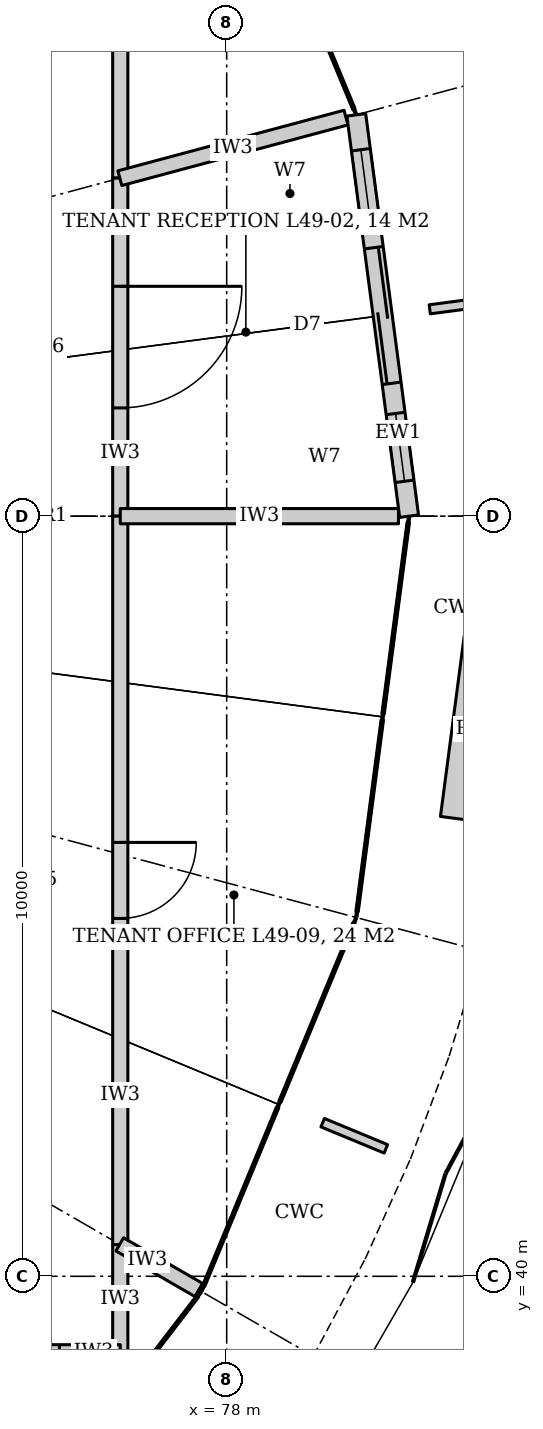
"""IFC4 building model, lengths in metres.
Left out: names, types, materials, properties, quantities, classifications, styles, units other than length and angle.
Written with IfcOpenShell. Run it as: python <this file> out.ifc"""

import sys

from ifc_helpers import new_model, si_unit, direction, frame, frame_2d, origin, place, context, subcontext, project, spatial, rectangle, extrude, element, fill, save


model = new_model("IFC4")
c1 = context("Model", 3, precision=1e-05, world=origin(), true_north=direction((0.0, 1.0)))
c2 = subcontext(c1, "Body", "Model", "MODEL_VIEW")
j1 = project(units=[si_unit("LENGTHUNIT", "METRE"), si_unit("PLANEANGLEUNIT", "RADIAN")], contexts=[c1])
p1 = place(None, origin())
s1 = spatial("IfcSite", under=j1, at=p1, CompositionType="ELEMENT")
p2 = place(p1, origin())
s2 = spatial("IfcBuilding", under=s1, at=p2, CompositionType="ELEMENT")
p3 = place(p2, frame((0.0, 0.0, 215.0)))
s3 = spatial("IfcBuildingStorey", under=s2, at=p3, CompositionType="ELEMENT", Elevation=215.0)
p4 = place(p3, frame((76.6, 58.8, 0.0), z_axis=(0.0, 0.0, 1.0), x_axis=(0.0, -1.0, 0.0)))
e1 = element("IfcWall", 1, at=p4, inside=s3, PredefinedType="PARTITIONING", context=c2, shape_type="SweptSolid", body=[
    extrude(rectangle(XDim=4.352, YDim=0.2, at=frame_2d((2.176, 0.0))), origin(), (0.0, 0.0, 1.0), 3.012),
])
p5 = place(p3, frame((76.6, 54.448, 0.0), z_axis=(0.0, 0.0, 1.0), x_axis=(0.0, -1.0, 0.0)))
e2 = element("IfcWall", 2, at=p5, inside=s3, PredefinedType="PARTITIONING", context=c2, shape_type="SweptSolid", body=[
    extrude(rectangle(XDim=4.448, YDim=0.2, at=frame_2d((2.224, 0.0))), origin(), (0.0, 0.0, 1.0), 3.012),
])
p6 = place(p5, frame((1.424, 0.0, 0.0)))
e3 = element("IfcOpeningElement", 3, at=p6, cuts=e2, PredefinedType="OPENING", context=c2, shape_type="SweptSolid", body=[
    extrude(rectangle(XDim=1.6, YDim=2.4, at=frame_2d((0.8, 1.2))), frame((0.0, 0.11, 0.0), z_axis=(0.0, -1.0, 0.0), x_axis=(1.0, 0.0, 0.0)), (0.0, 0.0, 1.0), 0.22),
])
p7 = place(p3, frame((76.6, 50.0, 0.0), z_axis=(0.0, 0.0, 1.0), x_axis=(0.0, -1.0, 0.0)))
e4 = element("IfcWall", 4, at=p7, inside=s3, PredefinedType="PARTITIONING", context=c2, shape_type="SweptSolid", body=[
    extrude(rectangle(XDim=9.584, YDim=0.2, at=frame_2d((4.792, 0.0))), origin(), (0.0, 0.0, 1.0), 3.012),
])
p8 = place(p7, frame((4.292, 0.0, 0.0)))
e5 = element("IfcOpeningElement", 5, at=p8, cuts=e4, PredefinedType="OPENING", context=c2, shape_type="SweptSolid", body=[
    extrude(rectangle(XDim=1.0, YDim=2.1, at=frame_2d((0.5, 1.05))), frame((0.0, 0.11, 0.0), z_axis=(0.0, -1.0, 0.0), x_axis=(1.0, 0.0, 0.0)), (0.0, 0.0, 1.0), 0.22),
])
p9 = place(p3, frame((76.6, 40.416, 0.0), z_axis=(0.0, 0.0, 1.0), x_axis=(0.0, -1.0, 0.0)))
e6 = element("IfcWall", 6, at=p9, inside=s3, PredefinedType="PARTITIONING", context=c2, shape_type="SweptSolid", body=[
    extrude(rectangle(XDim=1.416, YDim=0.2, at=frame_2d((0.708, 0.0))), origin(), (0.0, 0.0, 1.0), 3.04),
])
p10 = place(p3, frame((76.6, 39.0, 0.0), z_axis=(0.0, 0.0, 1.0), x_axis=(-1.0, 0.0, 0.0)))
e7 = element("IfcWall", 7, at=p10, inside=s3, PredefinedType="PARTITIONING", context=c2, shape_type="SweptSolid", body=[
    extrude(rectangle(XDim=3.6, YDim=0.2, at=frame_2d((1.8, 0.0))), origin(), (0.0, 0.0, 1.0), 3.012),
])
p11 = place(p10, frame((0.8, 0.0, 0.0)))
e8 = element("IfcOpeningElement", 8, at=p11, cuts=e7, PredefinedType="OPENING", context=c2, shape_type="SweptSolid", body=[
    extrude(rectangle(XDim=2.0, YDim=2.1, at=frame_2d((1.0, 1.05))), frame((0.0, 0.11, 0.0), z_axis=(0.0, -1.0, 0.0), x_axis=(1.0, 0.0, 0.0)), (0.0, 0.0, 1.0), 0.22),
])
p12 = place(p3, frame((76.6, 50.0, 0.0), z_axis=(0.0, 0.0, 1.0), x_axis=(1.0, 0.0, 0.0)))
e9 = element("IfcWall", 9, at=p12, inside=s3, PredefinedType="PARTITIONING", context=c2, shape_type="SweptSolid", body=[
    extrude(rectangle(XDim=3.66, YDim=0.2, at=frame_2d((1.83, 0.0))), origin(), (0.0, 0.0, 1.0), 3.04),
])
p13 = place(p3, frame((76.594, 54.447, 0.0), z_axis=(0.0, 0.0, 1.0), x_axis=(0.9659303613, 0.258802119616, 0.0)))
e10 = element("IfcWall", 10, at=p13, inside=s3, PredefinedType="PARTITIONING", context=c2, shape_type="SweptSolid", body=[
    extrude(rectangle(XDim=3.08, YDim=0.2, at=frame_2d((1.54, 0.0))), origin(), (0.0, 0.0, 1.0), 3.04),
])
p14 = place(p3, frame((76.593, 40.42, 0.0), z_axis=(0.0, 0.0, 1.0), x_axis=(0.866094119867, -0.499880961361, 0.0)))
e11 = element("IfcWall", 11, at=p14, inside=s3, PredefinedType="PARTITIONING", context=c2, shape_type="SweptSolid", body=[
    extrude(rectangle(XDim=1.2, YDim=0.2, at=frame_2d((0.6, 0.0))), origin(), (0.0, 0.0, 1.0), 3.04),
])
p15 = place(p3, frame((80.4, 50.0, 0.0), z_axis=(0.0, 0.0, 1.0), x_axis=(-0.130514991371, 0.991446335929, 0.0)))
e12 = element("IfcWall", 12, at=p15, inside=s3, PredefinedType="SOLIDWALL", context=c2, shape_type="SweptSolid", body=[
    extrude(rectangle(XDim=5.326, YDim=0.25, at=frame_2d((2.663, 0.0))), origin(), (0.0, 0.0, 1.0), 4.04),
])
p16 = place(p15, frame((1.763, 0.0, 0.0)))
e13 = element("IfcOpeningElement", 13, at=p16, cuts=e12, PredefinedType="OPENING", context=c2, shape_type="SweptSolid", body=[
    extrude(rectangle(XDim=1.8, YDim=2.4, at=frame_2d((0.9, 1.2))), frame((0.0, 0.135, 0.0), z_axis=(0.0, -1.0, 0.0), x_axis=(1.0, 0.0, 0.0)), (0.0, 0.0, 1.0), 0.27),
])
p17 = place(p15, frame((0.463, 0.0, 0.0)))
e14 = element("IfcOpeningElement", 14, at=p17, cuts=e12, PredefinedType="OPENING", context=c2, shape_type="SweptSolid", body=[
    extrude(rectangle(XDim=0.9, YDim=2.4, at=frame_2d((0.45, 1.2))), frame((0.0, 0.135, 0.0), z_axis=(0.0, -1.0, 0.0), x_axis=(1.0, 0.0, 0.0)), (0.0, 0.0, 1.0), 0.27),
])
p18 = place(p15, frame((3.963, 0.0, 0.0)))
e15 = element("IfcOpeningElement", 15, at=p18, cuts=e12, PredefinedType="OPENING", context=c2, shape_type="SweptSolid", body=[
    extrude(rectangle(XDim=0.9, YDim=2.4, at=frame_2d((0.45, 1.2))), frame((0.0, 0.135, 0.0), z_axis=(0.0, -1.0, 0.0), x_axis=(1.0, 0.0, 0.0)), (0.0, 0.0, 1.0), 0.27),
])
p19 = place(p6, origin())
e16 = element("IfcDoor", 16, at=p19, inside=s3, OperationType="DOUBLE_DOOR_DOUBLE_SWING", PredefinedType="DOOR", context=c2, shape_type="SweptSolid", body=[
    extrude(rectangle(XDim=1.6, YDim=2.4, at=frame_2d((0.8, 1.2))), frame((0.0, 0.025, 0.0), z_axis=(0.0, -1.0, 0.0), x_axis=(1.0, 0.0, 0.0)), (0.0, 0.0, 1.0), 0.05),
])
fill(e3, e16)
p20 = place(p8, origin())
e17 = element("IfcDoor", 17, at=p20, inside=s3, OperationType="SINGLE_SWING_LEFT", PredefinedType="DOOR", context=c2, shape_type="SweptSolid", body=[
    extrude(rectangle(XDim=1.0, YDim=2.1, at=frame_2d((0.5, 1.05))), frame((0.0, 0.025, 0.0), z_axis=(0.0, -1.0, 0.0), x_axis=(1.0, 0.0, 0.0)), (0.0, 0.0, 1.0), 0.05),
])
fill(e5, e17)
p21 = place(p16, origin())
e18 = element("IfcDoor", 18, at=p21, inside=s3, OperationType="DOUBLE_DOOR_SLIDING", PredefinedType="DOOR", context=c2, shape_type="SweptSolid", body=[
    extrude(rectangle(XDim=1.8, YDim=2.4, at=frame_2d((0.9, 1.2))), frame((0.0, 0.025, 0.0), z_axis=(0.0, -1.0, 0.0), x_axis=(1.0, 0.0, 0.0)), (0.0, 0.0, 1.0), 0.05),
])
fill(e13, e18)
p22 = place(p17, origin())
e19 = element("IfcWindow", 19, at=p22, inside=s3, PartitioningType="SINGLE_PANEL", PredefinedType="WINDOW", context=c2, shape_type="SweptSolid", body=[
    extrude(rectangle(XDim=0.9, YDim=2.4, at=frame_2d((0.45, 1.2))), frame((0.0, 0.03, 0.0), z_axis=(0.0, -1.0, 0.0), x_axis=(1.0, 0.0, 0.0)), (0.0, 0.0, 1.0), 0.06),
])
fill(e14, e19)
p23 = place(p18, origin())
e20 = element("IfcWindow", 20, at=p23, inside=s3, PartitioningType="SINGLE_PANEL", PredefinedType="WINDOW", context=c2, shape_type="SweptSolid", body=[
    extrude(rectangle(XDim=0.9, YDim=2.4, at=frame_2d((0.45, 1.2))), frame((0.0, 0.03, 0.0), z_axis=(0.0, -1.0, 0.0), x_axis=(1.0, 0.0, 0.0)), (0.0, 0.0, 1.0), 0.06),
])
fill(e15, e20)
save(model, sys.argv[1])
